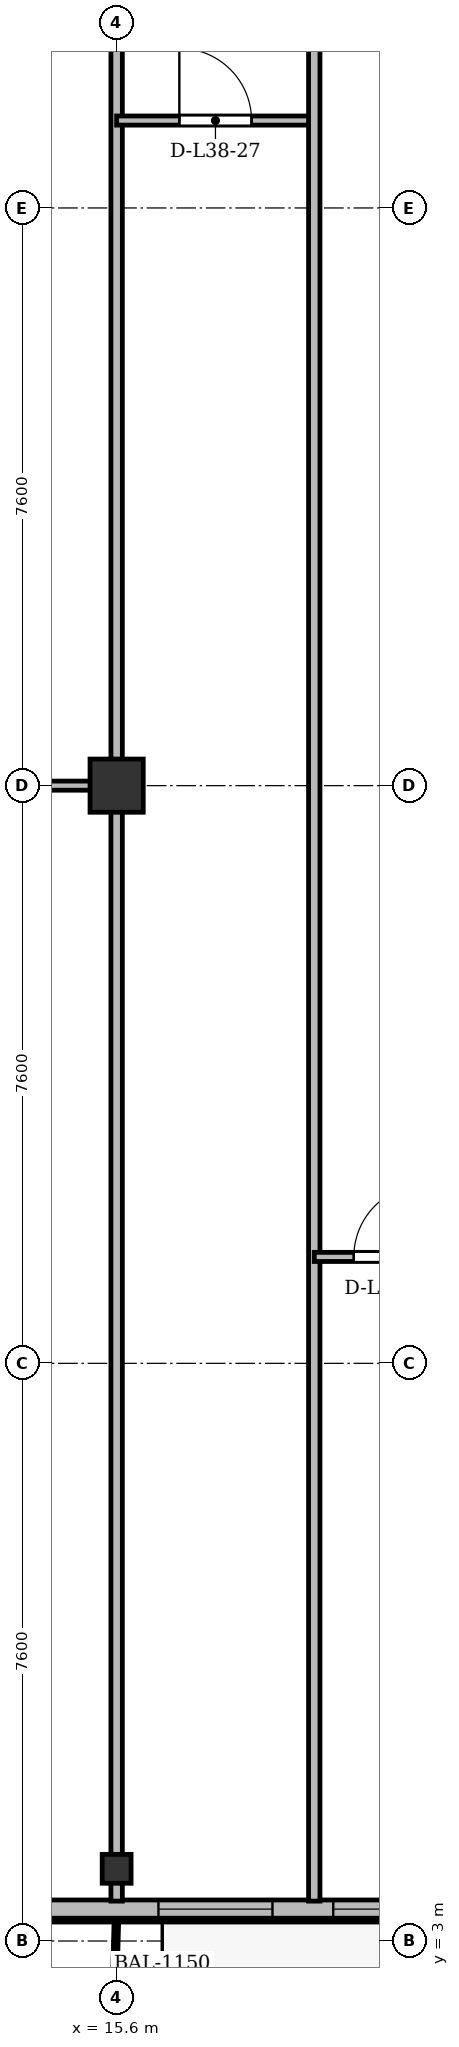
"""IFC4 building model, lengths in metres.
Left out: names, types, materials, properties, quantities, classifications, styles, units other than length and angle.
Written with IfcOpenShell. Run it as: python <this file> out.ifc"""

import sys

from ifc_helpers import new_model, si_unit, direction, frame, frame_2d, origin, origin_2d, place, context, subcontext, project, spatial, rectangle, i_section, extrude, source, transform, mapped, element, fill, save


model = new_model("IFC4")
c1 = context("Model", 3, precision=1e-05, world=origin(), true_north=direction((0.0, 1.0)))
c2 = subcontext(c1, "Body", "Model", "MODEL_VIEW")
j1 = project(units=[si_unit("LENGTHUNIT", "METRE"), si_unit("PLANEANGLEUNIT", "RADIAN")], contexts=[c1])
p1 = place(None, origin())
s1 = spatial("IfcSite", under=j1, at=p1, CompositionType="ELEMENT")
p2 = place(p1, origin())
s2 = spatial("IfcBuilding", under=s1, at=p2, CompositionType="ELEMENT")
p3 = place(p2, frame((0.0, 0.0, 146.5)))
s3 = spatial("IfcBuildingStorey", under=s2, at=p3, CompositionType="ELEMENT", Elevation=146.5)
m1 = source(origin(), c2, "Body", "SweptSolid", [
    extrude(i_section(OverallWidth=0.38, OverallDepth=0.38, WebThickness=0.02, FlangeThickness=0.03, at=origin_2d()), origin(), (0.0, 0.0, 1.0), 3.6),
])
p4 = place(p3, frame((15.6, 3.95, 0.0), z_axis=(0.0, 0.0, 1.0), x_axis=(1.0, 0.0, 0.0)))
e1 = element("IfcColumn", 1, at=p4, inside=s3, PredefinedType="COLUMN", context=c2, shape_type="MappedRepresentation", body=[
    mapped(m1, transform((0.0, 0.0, 0.0), x_axis=(1.0, 0.0, 0.0), y_axis=(0.0, 1.0, 0.0), z_axis=(0.0, 0.0, 1.0), scale=1.0)),
])
m2 = source(origin(), c2, "Body", "SweptSolid", [
    extrude(rectangle(XDim=0.7, YDim=0.7, at=origin_2d()), origin(), (0.0, 0.0, 1.0), 3.6),
])
p5 = place(p3, frame((15.6, 18.2, 0.0), z_axis=(0.0, 0.0, 1.0), x_axis=(1.0, 0.0, 0.0)))
e2 = element("IfcColumn", 2, at=p5, inside=s3, PredefinedType="COLUMN", context=c2, shape_type="MappedRepresentation", body=[
    mapped(m2, transform((0.0, 0.0, 0.0), x_axis=(1.0, 0.0, 0.0), y_axis=(0.0, 1.0, 0.0), z_axis=(0.0, 0.0, 1.0), scale=1.0)),
])
p6 = place(p3, frame((63.6, 3.42, 0.0), z_axis=(0.0, 0.0, 1.0), x_axis=(-1.0, 0.0, 0.0)))
e3 = element("IfcWall", 3, at=p6, inside=s3, PredefinedType="SOLIDWALL", context=c2, shape_type="SweptSolid", body=[
    extrude(rectangle(XDim=52.8, YDim=0.24, at=frame_2d((26.4, 0.0))), origin(), (0.0, 0.0, 1.0), 3.35),
])
p7 = place(p6, frame((1.445, 0.0, 0.9)))
e4 = element("IfcOpeningElement", 4, at=p7, cuts=e3, PredefinedType="OPENING", context=c2, shape_type="SweptSolid", body=[
    extrude(rectangle(XDim=2.0, YDim=1.95, at=frame_2d((1.0, 0.975))), frame((0.0, 0.13, 0.0), z_axis=(0.0, -1.0, 0.0), x_axis=(1.0, 0.0, 0.0)), (0.0, 0.0, 1.0), 0.26),
])
p8 = place(p6, frame((5.275, 0.0, 0.9)))
e5 = element("IfcOpeningElement", 5, at=p8, cuts=e3, PredefinedType="OPENING", context=c2, shape_type="SweptSolid", body=[
    extrude(rectangle(XDim=1.65, YDim=1.85, at=frame_2d((0.825, 0.925))), frame((0.0, 0.13, 0.0), z_axis=(0.0, -1.0, 0.0), x_axis=(1.0, 0.0, 0.0)), (0.0, 0.0, 1.0), 0.26),
])
p9 = place(p6, frame((7.65, 0.0, 0.9)))
e6 = element("IfcOpeningElement", 6, at=p9, cuts=e3, PredefinedType="OPENING", context=c2, shape_type="SweptSolid", body=[
    extrude(rectangle(XDim=1.5, YDim=1.75, at=frame_2d((0.75, 0.875))), frame((0.0, 0.13, 0.0), z_axis=(0.0, -1.0, 0.0), x_axis=(1.0, 0.0, 0.0)), (0.0, 0.0, 1.0), 0.26),
])
p10 = place(p6, frame((9.9, 0.0, 0.9)))
e7 = element("IfcOpeningElement", 7, at=p10, cuts=e3, PredefinedType="OPENING", context=c2, shape_type="SweptSolid", body=[
    extrude(rectangle(XDim=2.2, YDim=1.8, at=frame_2d((1.1, 0.9))), frame((0.0, 0.13, 0.0), z_axis=(0.0, -1.0, 0.0), x_axis=(1.0, 0.0, 0.0)), (0.0, 0.0, 1.0), 0.26),
])
p11 = place(p6, frame((14.417, 0.0, 0.0)))
e8 = element("IfcOpeningElement", 8, at=p11, cuts=e3, PredefinedType="OPENING", context=c2, shape_type="SweptSolid", body=[
    extrude(rectangle(XDim=1.2, YDim=2.2, at=frame_2d((0.6, 1.1))), frame((0.0, 0.13, 0.0), z_axis=(0.0, -1.0, 0.0), x_axis=(1.0, 0.0, 0.0)), (0.0, 0.0, 1.0), 0.26),
])
p12 = place(p6, frame((25.4, 0.0, 0.9)))
e9 = element("IfcOpeningElement", 9, at=p12, cuts=e3, PredefinedType="OPENING", context=c2, shape_type="SweptSolid", body=[
    extrude(rectangle(XDim=2.0, YDim=1.95, at=frame_2d((1.0, 0.975))), frame((0.0, 0.13, 0.0), z_axis=(0.0, -1.0, 0.0), x_axis=(1.0, 0.0, 0.0)), (0.0, 0.0, 1.0), 0.26),
])
p13 = place(p6, frame((35.775, 0.0, 0.9)))
e10 = element("IfcOpeningElement", 10, at=p13, cuts=e3, PredefinedType="OPENING", context=c2, shape_type="SweptSolid", body=[
    extrude(rectangle(XDim=1.65, YDim=1.85, at=frame_2d((0.825, 0.925))), frame((0.0, 0.13, 0.0), z_axis=(0.0, -1.0, 0.0), x_axis=(1.0, 0.0, 0.0)), (0.0, 0.0, 1.0), 0.26),
])
p14 = place(p6, frame((41.656, 0.0, 0.0)))
e11 = element("IfcOpeningElement", 11, at=p14, cuts=e3, PredefinedType="OPENING", context=c2, shape_type="SweptSolid", body=[
    extrude(rectangle(XDim=1.2, YDim=2.2, at=frame_2d((0.6, 1.1))), frame((0.0, 0.13, 0.0), z_axis=(0.0, -1.0, 0.0), x_axis=(1.0, 0.0, 0.0)), (0.0, 0.0, 1.0), 0.26),
])
p15 = place(p6, frame((43.65, 0.0, 0.9)))
e12 = element("IfcOpeningElement", 12, at=p15, cuts=e3, PredefinedType="OPENING", context=c2, shape_type="SweptSolid", body=[
    extrude(rectangle(XDim=1.5, YDim=1.75, at=frame_2d((0.75, 0.875))), frame((0.0, 0.13, 0.0), z_axis=(0.0, -1.0, 0.0), x_axis=(1.0, 0.0, 0.0)), (0.0, 0.0, 1.0), 0.26),
])
p16 = place(p6, frame((45.95, 0.0, 0.9)))
e13 = element("IfcOpeningElement", 13, at=p16, cuts=e3, PredefinedType="OPENING", context=c2, shape_type="SweptSolid", body=[
    extrude(rectangle(XDim=1.5, YDim=1.75, at=frame_2d((0.75, 0.875))), frame((0.0, 0.13, 0.0), z_axis=(0.0, -1.0, 0.0), x_axis=(1.0, 0.0, 0.0)), (0.0, 0.0, 1.0), 0.26),
])
p17 = place(p6, frame((49.355, 0.0, 0.9)))
e14 = element("IfcOpeningElement", 14, at=p17, cuts=e3, PredefinedType="OPENING", context=c2, shape_type="SweptSolid", body=[
    extrude(rectangle(XDim=2.0, YDim=1.95, at=frame_2d((1.0, 0.975))), frame((0.0, 0.13, 0.0), z_axis=(0.0, -1.0, 0.0), x_axis=(1.0, 0.0, 0.0)), (0.0, 0.0, 1.0), 0.26),
])
p18 = place(p3, frame((15.6, 3.525, 0.0), z_axis=(0.0, 0.0, 1.0), x_axis=(0.0, 1.0, 0.0)))
e15 = element("IfcWall", 15, at=p18, inside=s3, PredefinedType="PARTITIONING", context=c2, shape_type="SweptSolid", body=[
    extrude(rectangle(XDim=27.275, YDim=0.15, at=frame_2d((13.638, 0.0))), origin(), (0.0, 0.0, 1.0), 2.85),
])
p19 = place(p3, frame((8.025, 18.2, 0.0), z_axis=(0.0, 0.0, 1.0), x_axis=(1.0, 0.0, 0.0)))
e16 = element("IfcWall", 16, at=p19, inside=s3, PredefinedType="PARTITIONING", context=c2, shape_type="SweptSolid", body=[
    extrude(rectangle(XDim=7.575, YDim=0.12, at=frame_2d((3.788, 0.0))), origin(), (0.0, 0.0, 1.0), 2.75),
])
p20 = place(p19, frame((3.312, 0.0, 0.0)))
e17 = element("IfcOpeningElement", 17, at=p20, cuts=e16, PredefinedType="OPENING", context=c2, shape_type="SweptSolid", body=[
    extrude(rectangle(XDim=0.95, YDim=2.15, at=frame_2d((0.475, 1.075))), frame((0.0, 0.07, 0.0), z_axis=(0.0, -1.0, 0.0), x_axis=(1.0, 0.0, 0.0)), (0.0, 0.0, 1.0), 0.14),
])
p21 = place(p3, frame((15.6, 26.95, 0.0), z_axis=(0.0, 0.0, 1.0), x_axis=(1.0, 0.0, 0.0)))
e18 = element("IfcWall", 18, at=p21, inside=s3, PredefinedType="PARTITIONING", context=c2, shape_type="SweptSolid", body=[
    extrude(rectangle(XDim=2.6, YDim=0.12, at=frame_2d((1.3, 0.0))), origin(), (0.0, 0.0, 1.0), 2.85),
])
p22 = place(p21, frame((0.825, 0.0, 0.0)))
e19 = element("IfcOpeningElement", 19, at=p22, cuts=e18, PredefinedType="OPENING", context=c2, shape_type="SweptSolid", body=[
    extrude(rectangle(XDim=0.95, YDim=2.15, at=frame_2d((0.475, 1.075))), frame((0.0, 0.07, 0.0), z_axis=(0.0, -1.0, 0.0), x_axis=(1.0, 0.0, 0.0)), (0.0, 0.0, 1.0), 0.14),
])
p23 = place(p3, frame((18.2, 3.525, 0.0), z_axis=(0.0, 0.0, 1.0), x_axis=(0.0, 1.0, 0.0)))
e20 = element("IfcWall", 20, at=p23, inside=s3, PredefinedType="PARTITIONING", context=c2, shape_type="SweptSolid", body=[
    extrude(rectangle(XDim=27.275, YDim=0.15, at=frame_2d((13.638, 0.0))), origin(), (0.0, 0.0, 1.0), 2.75),
])
p24 = place(p3, frame((18.2, 12.0, 0.0), z_axis=(0.0, 0.0, 1.0), x_axis=(1.0, 0.0, 0.0)))
e21 = element("IfcWall", 21, at=p24, inside=s3, PredefinedType="PARTITIONING", context=c2, shape_type="SweptSolid", body=[
    extrude(rectangle(XDim=2.0, YDim=0.12, at=frame_2d((1.0, 0.0))), origin(), (0.0, 0.0, 1.0), 3.35),
])
p25 = place(p24, frame((0.52, 0.0, 0.0)))
e22 = element("IfcOpeningElement", 22, at=p25, cuts=e21, PredefinedType="OPENING", context=c2, shape_type="SweptSolid", body=[
    extrude(rectangle(XDim=0.95, YDim=2.15, at=frame_2d((0.475, 1.075))), frame((0.0, 0.07, 0.0), z_axis=(0.0, -1.0, 0.0), x_axis=(1.0, 0.0, 0.0)), (0.0, 0.0, 1.0), 0.14),
])
m3 = source(origin(), c2, "Body", "SweptSolid", [
    extrude(rectangle(XDim=1.5, YDim=1.75, at=frame_2d((0.75, 0.875))), frame((0.0, 0.03, 0.0), z_axis=(0.0, -1.0, 0.0), x_axis=(1.0, 0.0, 0.0)), (0.0, 0.0, 1.0), 0.06),
])
p26 = place(p15, origin())
e23 = element("IfcWindow", 23, at=p26, inside=s3, PartitioningType="SINGLE_PANEL", PredefinedType="WINDOW", context=c2, shape_type="MappedRepresentation", body=[
    mapped(m3, transform((0.0, 0.0, 0.0), x_axis=(1.0, 0.0, 0.0), y_axis=(0.0, 1.0, 0.0), z_axis=(0.0, 0.0, 1.0), scale=1.0)),
])
fill(e12, e23)
p27 = place(p16, origin())
e24 = element("IfcWindow", 24, at=p27, inside=s3, PartitioningType="SINGLE_PANEL", PredefinedType="WINDOW", context=c2, shape_type="MappedRepresentation", body=[
    mapped(m3, transform((0.0, 0.0, 0.0), x_axis=(1.0, 0.0, 0.0), y_axis=(0.0, 1.0, 0.0), z_axis=(0.0, 0.0, 1.0), scale=1.0)),
])
fill(e13, e24)
m4 = source(origin(), c2, "Body", "SweptSolid", [
    extrude(rectangle(XDim=0.95, YDim=2.15, at=frame_2d((0.475, 1.075))), frame((0.0, 0.025, 0.0), z_axis=(0.0, -1.0, 0.0), x_axis=(1.0, 0.0, 0.0)), (0.0, 0.0, 1.0), 0.05),
])
p28 = place(p22, origin())
e25 = element("IfcDoor", 25, at=p28, inside=s3, OperationType="SINGLE_SWING_LEFT", PredefinedType="DOOR", context=c2, shape_type="MappedRepresentation", body=[
    mapped(m4, transform((0.0, 0.0, 0.0), x_axis=(1.0, 0.0, 0.0), y_axis=(0.0, 1.0, 0.0), z_axis=(0.0, 0.0, 1.0), scale=1.0)),
])
fill(e19, e25)
p29 = place(p25, origin())
e26 = element("IfcDoor", 26, at=p29, inside=s3, OperationType="SINGLE_SWING_RIGHT", PredefinedType="DOOR", context=c2, shape_type="MappedRepresentation", body=[
    mapped(m4, transform((0.0, 0.0, 0.0), x_axis=(1.0, 0.0, 0.0), y_axis=(0.0, 1.0, 0.0), z_axis=(0.0, 0.0, 1.0), scale=1.0)),
])
fill(e22, e26)
save(model, sys.argv[1])
